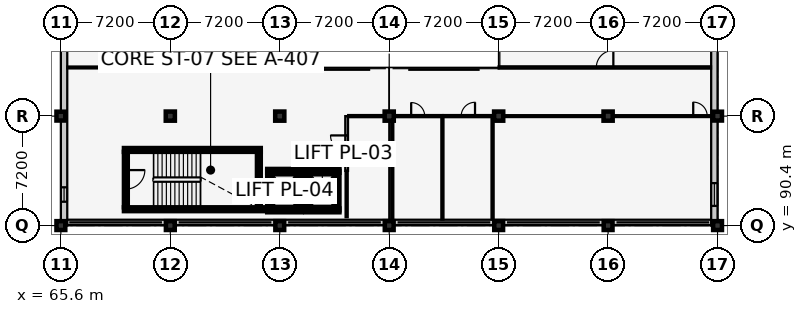
"""IFC4 building model, lengths in metres.
Left out: names, types, materials, properties, quantities, classifications, styles, units other than length and angle.
Written with IfcOpenShell. Run it as: python <this file> out.ifc"""

import sys

from ifc_helpers import new_model, si_unit, direction, frame, frame_2d, origin, origin_2d, place, context, subcontext, project, spatial, rectangle, extrude, element, fill, save


model = new_model("IFC4")
c1 = context("Model", 3, precision=1e-05, world=origin(), true_north=direction((0.0, 1.0)))
c2 = subcontext(c1, "Body", "Model", "MODEL_VIEW")
j1 = project(units=[si_unit("LENGTHUNIT", "METRE"), si_unit("PLANEANGLEUNIT", "RADIAN")], contexts=[c1])
p1 = place(None, origin())
s1 = spatial("IfcSite", under=j1, at=p1, CompositionType="ELEMENT")
p2 = place(p1, origin())
s2 = spatial("IfcBuilding", under=s1, at=p2, CompositionType="ELEMENT")
p3 = place(p2, frame((0.0, 0.0, 9.6)))
s3 = spatial("IfcBuildingStorey", under=s2, at=p3, CompositionType="ELEMENT", Elevation=9.6)
for number, where, z_axis, x_axis in (
    (1, (65.6, 90.4, 0.0), (0.0, 0.0, 1.0), (1.0, 0.0, 0.0)),
    (2, (65.6, 97.6, 0.0), (0.0, 0.0, 1.0), (1.0, 0.0, 0.0)),
    (3, (72.8, 90.4, 0.0), (0.0, 0.0, 1.0), (1.0, 0.0, 0.0)),
):
    element("IfcColumn", number, at=place(p3, frame(where, z_axis=z_axis, x_axis=x_axis)), inside=s3, PredefinedType="COLUMN", context=c2, shape_type="SweptSolid", body=[
        extrude(rectangle(XDim=0.58, YDim=0.58, at=origin_2d()), origin(), (0.0, 0.0, 1.0), 4.2),
    ])
p4 = place(p3, frame((72.8, 97.6, 0.0), z_axis=(0.0, 0.0, 1.0), x_axis=(1.0, 0.0, 0.0)))
e4 = element("IfcColumn", 4, at=p4, inside=s3, PredefinedType="COLUMN", context=c2, shape_type="SweptSolid", body=[
    extrude(rectangle(XDim=0.6, YDim=0.6, at=origin_2d()), origin(), (0.0, 0.0, 1.0), 4.2),
])
p5 = place(p3, frame((80.0, 90.4, 0.0), z_axis=(0.0, 0.0, 1.0), x_axis=(1.0, 0.0, 0.0)))
e5 = element("IfcColumn", 5, at=p5, inside=s3, PredefinedType="COLUMN", context=c2, shape_type="SweptSolid", body=[
    extrude(rectangle(XDim=0.58, YDim=0.58, at=origin_2d()), origin(), (0.0, 0.0, 1.0), 4.2),
])
p6 = place(p3, frame((80.0, 97.6, 0.0), z_axis=(0.0, 0.0, 1.0), x_axis=(1.0, 0.0, 0.0)))
e6 = element("IfcColumn", 6, at=p6, inside=s3, PredefinedType="COLUMN", context=c2, shape_type="SweptSolid", body=[
    extrude(rectangle(XDim=0.6, YDim=0.6, at=origin_2d()), origin(), (0.0, 0.0, 1.0), 4.2),
])
p7 = place(p3, frame((87.2, 90.4, 0.0), z_axis=(0.0, 0.0, 1.0), x_axis=(1.0, 0.0, 0.0)))
e7 = element("IfcColumn", 7, at=p7, inside=s3, PredefinedType="COLUMN", context=c2, shape_type="SweptSolid", body=[
    extrude(rectangle(XDim=0.58, YDim=0.58, at=origin_2d()), origin(), (0.0, 0.0, 1.0), 4.2),
])
p8 = place(p3, frame((87.2, 97.6, 0.0), z_axis=(0.0, 0.0, 1.0), x_axis=(1.0, 0.0, 0.0)))
e8 = element("IfcColumn", 8, at=p8, inside=s3, PredefinedType="COLUMN", context=c2, shape_type="SweptSolid", body=[
    extrude(rectangle(XDim=0.6, YDim=0.6, at=origin_2d()), origin(), (0.0, 0.0, 1.0), 4.2),
])
p9 = place(p3, frame((94.4, 90.4, 0.0), z_axis=(0.0, 0.0, 1.0), x_axis=(1.0, 0.0, 0.0)))
e9 = element("IfcColumn", 9, at=p9, inside=s3, PredefinedType="COLUMN", context=c2, shape_type="SweptSolid", body=[
    extrude(rectangle(XDim=0.58, YDim=0.58, at=origin_2d()), origin(), (0.0, 0.0, 1.0), 4.2),
])
p10 = place(p3, frame((94.4, 97.6, 0.0), z_axis=(0.0, 0.0, 1.0), x_axis=(1.0, 0.0, 0.0)))
e10 = element("IfcColumn", 10, at=p10, inside=s3, PredefinedType="COLUMN", context=c2, shape_type="SweptSolid", body=[
    extrude(rectangle(XDim=0.6, YDim=0.6, at=origin_2d()), origin(), (0.0, 0.0, 1.0), 4.2),
])
p11 = place(p3, frame((101.6, 90.4, 0.0), z_axis=(0.0, 0.0, 1.0), x_axis=(1.0, 0.0, 0.0)))
e11 = element("IfcColumn", 11, at=p11, inside=s3, PredefinedType="COLUMN", context=c2, shape_type="SweptSolid", body=[
    extrude(rectangle(XDim=0.58, YDim=0.58, at=origin_2d()), origin(), (0.0, 0.0, 1.0), 4.2),
])
p12 = place(p3, frame((101.6, 97.6, 0.0), z_axis=(0.0, 0.0, 1.0), x_axis=(1.0, 0.0, 0.0)))
e12 = element("IfcColumn", 12, at=p12, inside=s3, PredefinedType="COLUMN", context=c2, shape_type="SweptSolid", body=[
    extrude(rectangle(XDim=0.6, YDim=0.6, at=origin_2d()), origin(), (0.0, 0.0, 1.0), 4.2),
])
for number, where, z_axis, x_axis in (
    (13, (108.8, 90.4, 0.0), (0.0, 0.0, 1.0), (1.0, 0.0, 0.0)),
    (14, (108.8, 97.6, 0.0), (0.0, 0.0, 1.0), (1.0, 0.0, 0.0)),
):
    element("IfcColumn", number, at=place(p3, frame(where, z_axis=z_axis, x_axis=x_axis)), inside=s3, PredefinedType="COLUMN", context=c2, shape_type="SweptSolid", body=[
        extrude(rectangle(XDim=0.58, YDim=0.58, at=origin_2d()), origin(), (0.0, 0.0, 1.0), 4.2),
    ])
p13 = place(p3, frame((108.8, 90.61, 0.0), z_axis=(0.0, 0.0, 1.0), x_axis=(-1.0, 0.0, 0.0)))
e15 = element("IfcWall", 15, at=p13, inside=s3, PredefinedType="SOLIDWALL", context=c2, shape_type="SweptSolid", body=[
    extrude(rectangle(XDim=43.2, YDim=0.35, at=frame_2d((21.6, 0.0))), origin(), (0.0, 0.0, 1.0), 0.85),
])
p14 = place(p3, frame((108.59, 119.0, 0.0), z_axis=(0.0, 0.0, 1.0), x_axis=(0.0, -1.0, 0.0)))
e16 = element("IfcWall", 16, at=p14, inside=s3, PredefinedType="SOLIDWALL", context=c2, shape_type="SweptSolid", body=[
    extrude(rectangle(XDim=28.6, YDim=0.42, at=frame_2d((14.3, 0.0))), origin(), (0.0, 0.0, 1.0), 3.345),
])
p15 = place(p14, frame((1.318, 0.0, 0.9)))
e17 = element("IfcOpeningElement", 17, at=p15, cuts=e16, PredefinedType="OPENING", context=c2, shape_type="SweptSolid", body=[
    extrude(rectangle(XDim=1.45, YDim=1.45, at=frame_2d((0.725, 0.725))), frame((0.0, 0.222, 0.0), z_axis=(0.0, -1.0, 0.0), x_axis=(1.0, 0.0, 0.0)), (0.0, 0.0, 1.0), 0.444),
])
p16 = place(p14, frame((9.689, 0.0, 0.9)))
e18 = element("IfcOpeningElement", 18, at=p16, cuts=e16, PredefinedType="OPENING", context=c2, shape_type="SweptSolid", body=[
    extrude(rectangle(XDim=1.05, YDim=1.6, at=frame_2d((0.525, 0.8))), frame((0.0, 0.222, 0.0), z_axis=(0.0, -1.0, 0.0), x_axis=(1.0, 0.0, 0.0)), (0.0, 0.0, 1.0), 0.444),
])
p17 = place(p14, frame((25.807, 0.0, 0.9)))
e19 = element("IfcOpeningElement", 19, at=p17, cuts=e16, PredefinedType="OPENING", context=c2, shape_type="SweptSolid", body=[
    extrude(rectangle(XDim=1.5, YDim=1.6, at=frame_2d((0.75, 0.8))), frame((0.0, 0.222, 0.0), z_axis=(0.0, -1.0, 0.0), x_axis=(1.0, 0.0, 0.0)), (0.0, 0.0, 1.0), 0.444),
])
p18 = place(p3, frame((65.81, 90.4, 0.0), z_axis=(0.0, 0.0, 1.0), x_axis=(0.0, 1.0, 0.0)))
e20 = element("IfcWall", 20, at=p18, inside=s3, PredefinedType="SOLIDWALL", context=c2, shape_type="SweptSolid", body=[
    extrude(rectangle(XDim=28.6, YDim=0.42, at=frame_2d((14.3, 0.0))), origin(), (0.0, 0.0, 1.0), 3.315),
])
p19 = place(p18, frame((1.568, 0.0, 0.9)))
e21 = element("IfcOpeningElement", 21, at=p19, cuts=e20, PredefinedType="OPENING", context=c2, shape_type="SweptSolid", body=[
    extrude(rectangle(XDim=0.95, YDim=1.45, at=frame_2d((0.475, 0.725))), frame((0.0, 0.222, 0.0), z_axis=(0.0, -1.0, 0.0), x_axis=(1.0, 0.0, 0.0)), (0.0, 0.0, 1.0), 0.444),
])
p20 = place(p18, frame((17.711, 0.0, 0.9)))
e22 = element("IfcOpeningElement", 22, at=p20, cuts=e20, PredefinedType="OPENING", context=c2, shape_type="SweptSolid", body=[
    extrude(rectangle(XDim=1.35, YDim=1.45, at=frame_2d((0.675, 0.725))), frame((0.0, 0.222, 0.0), z_axis=(0.0, -1.0, 0.0), x_axis=(1.0, 0.0, 0.0)), (0.0, 0.0, 1.0), 0.444),
])
p21 = place(p18, frame((26.107, 0.0, 0.9)))
e23 = element("IfcOpeningElement", 23, at=p21, cuts=e20, PredefinedType="OPENING", context=c2, shape_type="SweptSolid", body=[
    extrude(rectangle(XDim=0.9, YDim=1.6, at=frame_2d((0.45, 0.8))), frame((0.0, 0.222, 0.0), z_axis=(0.0, -1.0, 0.0), x_axis=(1.0, 0.0, 0.0)), (0.0, 0.0, 1.0), 0.444),
])
p22 = place(p3, frame((69.75, 91.475, 0.0), z_axis=(0.0, 0.0, 1.0), x_axis=(1.0, 0.0, 0.0)))
e24 = element("IfcWall", 24, at=p22, inside=s3, PredefinedType="SHEAR", context=c2, shape_type="SweptSolid", body=[
    extrude(rectangle(XDim=9.57, YDim=0.25, at=frame_2d((4.785, 0.0))), origin(), (0.0, 0.0, 1.0), 3.92),
])
p23 = place(p3, frame((78.75, 95.375, 0.0), z_axis=(0.0, 0.0, 1.0), x_axis=(-1.0, 0.0, 0.0)))
e25 = element("IfcWall", 25, at=p23, inside=s3, PredefinedType="SHEAR", context=c2, shape_type="SweptSolid", body=[
    extrude(rectangle(XDim=9.0, YDim=0.25, at=frame_2d((4.5, 0.0))), origin(), (0.0, 0.0, 1.0), 3.92),
])
p24 = place(p3, frame((69.875, 95.25, 0.0), z_axis=(0.0, 0.0, 1.0), x_axis=(0.0, -1.0, 0.0)))
e26 = element("IfcWall", 26, at=p24, inside=s3, PredefinedType="SHEAR", context=c2, shape_type="SweptSolid", body=[
    extrude(rectangle(XDim=3.65, YDim=0.25, at=frame_2d((1.825, 0.0))), origin(), (0.0, 0.0, 1.0), 3.92),
])
p25 = place(p24, frame((1.2, 0.0, 0.0)))
e27 = element("IfcOpeningElement", 27, at=p25, cuts=e26, PredefinedType="OPENING", context=c2, shape_type="SweptSolid", body=[
    extrude(rectangle(XDim=1.25, YDim=2.15, at=frame_2d((0.625, 1.075))), frame((0.0, 0.137, 0.0), z_axis=(0.0, -1.0, 0.0), x_axis=(1.0, 0.0, 0.0)), (0.0, 0.0, 1.0), 0.274),
])
p26 = place(p3, frame((78.625, 91.6, 0.0), z_axis=(0.0, 0.0, 1.0), x_axis=(0.0, 1.0, 0.0)))
e28 = element("IfcWall", 28, at=p26, inside=s3, PredefinedType="SHEAR", context=c2, shape_type="SweptSolid", body=[
    extrude(rectangle(XDim=3.65, YDim=0.25, at=frame_2d((1.825, 0.0))), origin(), (0.0, 0.0, 1.0), 3.92),
])
p27 = place(p3, frame((79.175, 91.4, 0.0), z_axis=(0.0, 0.0, 1.0), x_axis=(1.0, 0.0, 0.0)))
e29 = element("IfcWall", 29, at=p27, inside=s3, PredefinedType="SHEAR", context=c2, shape_type="SweptSolid", body=[
    extrude(rectangle(XDim=2.25, YDim=0.25, at=frame_2d((1.125, 0.0))), origin(), (0.0, 0.0, 1.0), 3.92),
])
p28 = place(p3, frame((81.425, 94.0, 0.0), z_axis=(0.0, 0.0, 1.0), x_axis=(-1.0, 0.0, 0.0)))
e30 = element("IfcWall", 30, at=p28, inside=s3, PredefinedType="SHEAR", context=c2, shape_type="SweptSolid", body=[
    extrude(rectangle(XDim=2.25, YDim=0.25, at=frame_2d((1.125, 0.0))), origin(), (0.0, 0.0, 1.0), 3.92),
])
p29 = place(p28, frame((0.625, 0.0, 0.0)))
e31 = element("IfcOpeningElement", 31, at=p29, cuts=e30, PredefinedType="OPENING", context=c2, shape_type="SweptSolid", body=[
    extrude(rectangle(XDim=1.0, YDim=2.15, at=frame_2d((0.5, 1.075))), frame((0.0, 0.137, 0.0), z_axis=(0.0, -1.0, 0.0), x_axis=(1.0, 0.0, 0.0)), (0.0, 0.0, 1.0), 0.274),
])
for number, where, z_axis, x_axis in (
    (32, (79.3, 94.0, 0.0), (0.0, 0.0, 1.0), (0.0, -1.0, 0.0)),
    (33, (81.3, 91.4, 0.0), (0.0, 0.0, 1.0), (0.0, 1.0, 0.0)),
):
    element("IfcWall", number, at=place(p3, frame(where, z_axis=z_axis, x_axis=x_axis)), inside=s3, PredefinedType="SHEAR", context=c2, shape_type="SweptSolid", body=[
        extrude(rectangle(XDim=2.6, YDim=0.25, at=frame_2d((1.3, 0.0))), origin(), (0.0, 0.0, 1.0), 3.92),
    ])
p30 = place(p3, frame((81.675, 91.4, 0.0), z_axis=(0.0, 0.0, 1.0), x_axis=(1.0, 0.0, 0.0)))
e34 = element("IfcWall", 34, at=p30, inside=s3, PredefinedType="SHEAR", context=c2, shape_type="SweptSolid", body=[
    extrude(rectangle(XDim=2.25, YDim=0.25, at=frame_2d((1.125, 0.0))), origin(), (0.0, 0.0, 1.0), 3.92),
])
p31 = place(p3, frame((83.925, 94.0, 0.0), z_axis=(0.0, 0.0, 1.0), x_axis=(-1.0, 0.0, 0.0)))
e35 = element("IfcWall", 35, at=p31, inside=s3, PredefinedType="SHEAR", context=c2, shape_type="SweptSolid", body=[
    extrude(rectangle(XDim=2.25, YDim=0.25, at=frame_2d((1.125, 0.0))), origin(), (0.0, 0.0, 1.0), 3.92),
])
p32 = place(p31, frame((0.625, 0.0, 0.0)))
e36 = element("IfcOpeningElement", 36, at=p32, cuts=e35, PredefinedType="OPENING", context=c2, shape_type="SweptSolid", body=[
    extrude(rectangle(XDim=1.0, YDim=2.15, at=frame_2d((0.5, 1.075))), frame((0.0, 0.137, 0.0), z_axis=(0.0, -1.0, 0.0), x_axis=(1.0, 0.0, 0.0)), (0.0, 0.0, 1.0), 0.274),
])
for number, where, z_axis, x_axis in (
    (37, (81.8, 94.0, 0.0), (0.0, 0.0, 1.0), (0.0, -1.0, 0.0)),
    (38, (83.8, 91.4, 0.0), (0.0, 0.0, 1.0), (0.0, 1.0, 0.0)),
):
    element("IfcWall", number, at=place(p3, frame(where, z_axis=z_axis, x_axis=x_axis)), inside=s3, PredefinedType="SHEAR", context=c2, shape_type="SweptSolid", body=[
        extrude(rectangle(XDim=2.6, YDim=0.25, at=frame_2d((1.3, 0.0))), origin(), (0.0, 0.0, 1.0), 3.92),
    ])
p33 = place(p3, frame((84.4, 94.0, 0.0), z_axis=(0.0, 0.0, 1.0), x_axis=(0.0, 1.0, 0.0)))
e39 = element("IfcWall", 39, at=p33, inside=s3, PredefinedType="PARTITIONING", context=c2, shape_type="SweptSolid", body=[
    extrude(rectangle(XDim=3.6, YDim=0.18, at=frame_2d((1.8, 0.0))), origin(), (0.0, 0.0, 1.0), 3.92),
])
p34 = place(p33, frame((1.27, 0.0, 0.0)))
e40 = element("IfcOpeningElement", 40, at=p34, cuts=e39, PredefinedType="OPENING", context=c2, shape_type="SweptSolid", body=[
    extrude(rectangle(XDim=1.06, YDim=2.1, at=frame_2d((0.53, 1.05))), frame((0.0, 0.102, 0.0), z_axis=(0.0, -1.0, 0.0), x_axis=(1.0, 0.0, 0.0)), (0.0, 0.0, 1.0), 0.204),
])
p35 = place(p3, frame((84.5, 97.6, 0.0), z_axis=(0.0, 0.0, 1.0), x_axis=(1.0, 0.0, 0.0)))
e41 = element("IfcWall", 41, at=p35, inside=s3, PredefinedType="PARTITIONING", context=c2, shape_type="SweptSolid", body=[
    extrude(rectangle(XDim=2.9, YDim=0.14, at=frame_2d((1.45, 0.0))), origin(), (0.0, 0.0, 1.0), 3.095),
])
p36 = place(p3, frame((87.4, 90.8, 0.0), z_axis=(0.0, 0.0, 1.0), x_axis=(0.0, 1.0, 0.0)))
e42 = element("IfcWall", 42, at=p36, inside=s3, PredefinedType="PARTITIONING", context=c2, shape_type="SweptSolid", body=[
    extrude(rectangle(XDim=6.72, YDim=0.14, at=frame_2d((3.36, 0.0))), origin(), (0.0, 0.0, 1.0), 3.295),
])
p37 = place(p3, frame((87.48, 97.6, 0.0), z_axis=(0.0, 0.0, 1.0), x_axis=(1.0, 0.0, 0.0)))
e43 = element("IfcWall", 43, at=p37, inside=s3, PredefinedType="PARTITIONING", context=c2, shape_type="SweptSolid", body=[
    extrude(rectangle(XDim=3.22, YDim=0.14, at=frame_2d((1.61, 0.0))), origin(), (0.0, 0.0, 1.0), 3.045),
])
p38 = place(p37, frame((1.165, 0.0, 0.0)))
e44 = element("IfcOpeningElement", 44, at=p38, cuts=e43, PredefinedType="OPENING", context=c2, shape_type="SweptSolid", body=[
    extrude(rectangle(XDim=0.89, YDim=2.05, at=frame_2d((0.445, 1.025))), frame((0.0, 0.082, 0.0), z_axis=(0.0, -1.0, 0.0), x_axis=(1.0, 0.0, 0.0)), (0.0, 0.0, 1.0), 0.164),
])
p39 = place(p3, frame((90.7, 90.8, 0.0), z_axis=(0.0, 0.0, 1.0), x_axis=(0.0, 1.0, 0.0)))
e45 = element("IfcWall", 45, at=p39, inside=s3, PredefinedType="PARTITIONING", context=c2, shape_type="SweptSolid", body=[
    extrude(rectangle(XDim=6.72, YDim=0.14, at=frame_2d((3.36, 0.0))), origin(), (0.0, 0.0, 1.0), 3.495),
])
p40 = place(p3, frame((90.78, 97.6, 0.0), z_axis=(0.0, 0.0, 1.0), x_axis=(1.0, 0.0, 0.0)))
e46 = element("IfcWall", 46, at=p40, inside=s3, PredefinedType="PARTITIONING", context=c2, shape_type="SweptSolid", body=[
    extrude(rectangle(XDim=3.22, YDim=0.14, at=frame_2d((1.61, 0.0))), origin(), (0.0, 0.0, 1.0), 3.045),
])
p41 = place(p40, frame((1.155, 0.0, 0.0)))
e47 = element("IfcOpeningElement", 47, at=p41, cuts=e46, PredefinedType="OPENING", context=c2, shape_type="SweptSolid", body=[
    extrude(rectangle(XDim=0.91, YDim=2.06, at=frame_2d((0.455, 1.03))), frame((0.0, 0.082, 0.0), z_axis=(0.0, -1.0, 0.0), x_axis=(1.0, 0.0, 0.0)), (0.0, 0.0, 1.0), 0.164),
])
p42 = place(p3, frame((94.0, 90.8, 0.0), z_axis=(0.0, 0.0, 1.0), x_axis=(0.0, 1.0, 0.0)))
e48 = element("IfcWall", 48, at=p42, inside=s3, PredefinedType="PARTITIONING", context=c2, shape_type="SweptSolid", body=[
    extrude(rectangle(XDim=6.72, YDim=0.14, at=frame_2d((3.36, 0.0))), origin(), (0.0, 0.0, 1.0), 3.92),
])
p43 = place(p3, frame((94.08, 97.6, 0.0), z_axis=(0.0, 0.0, 1.0), x_axis=(1.0, 0.0, 0.0)))
e49 = element("IfcWall", 49, at=p43, inside=s3, PredefinedType="PARTITIONING", context=c2, shape_type="SweptSolid", body=[
    extrude(rectangle(XDim=14.29, YDim=0.125, at=frame_2d((7.145, 0.0))), origin(), (0.0, 0.0, 1.0), 3.235),
])
p44 = place(p43, frame((13.12, 0.0, 0.0)))
e50 = element("IfcOpeningElement", 50, at=p44, cuts=e49, PredefinedType="OPENING", context=c2, shape_type="SweptSolid", body=[
    extrude(rectangle(XDim=0.92, YDim=2.08, at=frame_2d((0.46, 1.04))), frame((0.0, 0.074, 0.0), z_axis=(0.0, -1.0, 0.0), x_axis=(1.0, 0.0, 0.0)), (0.0, 0.0, 1.0), 0.149),
])
p45 = place(p3, frame((77.0, 100.8, 0.0), z_axis=(0.0, 0.0, 1.0), x_axis=(0.0, 1.0, 0.0)))
e51 = element("IfcWall", 51, at=p45, inside=s3, PredefinedType="PARTITIONING", context=c2, shape_type="SweptSolid", body=[
    extrude(rectangle(XDim=17.77, YDim=0.18, at=frame_2d((8.885, 0.0))), origin(), (0.0, 0.0, 1.0), 3.92),
])
p46 = place(p45, frame((8.245, 0.0, 0.0)))
e52 = element("IfcOpeningElement", 52, at=p46, cuts=e51, PredefinedType="OPENING", context=c2, shape_type="SweptSolid", body=[
    extrude(rectangle(XDim=1.28, YDim=2.2, at=frame_2d((0.64, 1.1))), frame((0.0, 0.102, 0.0), z_axis=(0.0, -1.0, 0.0), x_axis=(1.0, 0.0, 0.0)), (0.0, 0.0, 1.0), 0.204),
])
p47 = place(p3, frame((66.03, 100.8, 0.0), z_axis=(0.0, 0.0, 1.0), x_axis=(1.0, 0.0, 0.0)))
e53 = element("IfcWall", 53, at=p47, inside=s3, PredefinedType="PARTITIONING", context=c2, shape_type="SweptSolid", body=[
    extrude(rectangle(XDim=10.87, YDim=0.125, at=frame_2d((5.435, 0.0))), origin(), (0.0, 0.0, 1.0), 3.92),
])
p48 = place(p3, frame((94.4, 100.8, 0.0), z_axis=(0.0, 0.0, 1.0), x_axis=(1.0, 0.0, 0.0)))
e54 = element("IfcWall", 54, at=p48, inside=s3, PredefinedType="PARTITIONING", context=c2, shape_type="SweptSolid", body=[
    extrude(rectangle(XDim=13.97, YDim=0.15, at=frame_2d((6.985, 0.0))), origin(), (0.0, 0.0, 1.0), 3.92),
])
p49 = place(p48, frame((6.425, 0.0, 0.0)))
e55 = element("IfcOpeningElement", 55, at=p49, cuts=e54, PredefinedType="OPENING", context=c2, shape_type="SweptSolid", body=[
    extrude(rectangle(XDim=1.12, YDim=2.15, at=frame_2d((0.56, 1.075))), frame((0.0, 0.087, 0.0), z_axis=(0.0, -1.0, 0.0), x_axis=(1.0, 0.0, 0.0)), (0.0, 0.0, 1.0), 0.174),
])
p50 = place(p3, frame((84.4, 90.95, 0.0), z_axis=(0.0, 0.0, 1.0), x_axis=(0.0, 1.0, 0.0)))
e56 = element("IfcWall", 56, at=p50, inside=s3, PredefinedType="PARTITIONING", context=c2, shape_type="SweptSolid", body=[
    extrude(rectangle(XDim=3.0, YDim=0.14, at=frame_2d((1.5, 0.0))), origin(), (0.0, 0.0, 1.0), 3.92),
])
p51 = place(p17, origin())
e57 = element("IfcWindow", 57, at=p51, inside=s3, PartitioningType="SINGLE_PANEL", PredefinedType="WINDOW", context=c2, shape_type="SweptSolid", body=[
    extrude(rectangle(XDim=1.5, YDim=1.6, at=frame_2d((0.75, 0.8))), frame((0.0, 0.03, 0.0), z_axis=(0.0, -1.0, 0.0), x_axis=(1.0, 0.0, 0.0)), (0.0, 0.0, 1.0), 0.06),
])
fill(e19, e57)
p52 = place(p19, origin())
e58 = element("IfcWindow", 58, at=p52, inside=s3, PartitioningType="SINGLE_PANEL", PredefinedType="WINDOW", context=c2, shape_type="SweptSolid", body=[
    extrude(rectangle(XDim=0.95, YDim=1.45, at=frame_2d((0.475, 0.725))), frame((0.0, 0.03, 0.0), z_axis=(0.0, -1.0, 0.0), x_axis=(1.0, 0.0, 0.0)), (0.0, 0.0, 1.0), 0.06),
])
fill(e21, e58)
p53 = place(p25, origin())
e59 = element("IfcDoor", 59, at=p53, inside=s3, OperationType="SINGLE_SWING_LEFT", PredefinedType="DOOR", context=c2, shape_type="SweptSolid", body=[
    extrude(rectangle(XDim=1.25, YDim=2.15, at=frame_2d((0.625, 1.075))), frame((0.0, 0.025, 0.0), z_axis=(0.0, -1.0, 0.0), x_axis=(1.0, 0.0, 0.0)), (0.0, 0.0, 1.0), 0.05),
])
fill(e27, e59)
p54 = place(p29, origin())
e60 = element("IfcDoor", 60, at=p54, inside=s3, OperationType="SLIDING_TO_LEFT", PredefinedType="DOOR", context=c2, shape_type="SweptSolid", body=[
    extrude(rectangle(XDim=1.0, YDim=2.15, at=frame_2d((0.5, 1.075))), frame((0.0, 0.025, 0.0), z_axis=(0.0, -1.0, 0.0), x_axis=(1.0, 0.0, 0.0)), (0.0, 0.0, 1.0), 0.05),
])
fill(e31, e60)
p55 = place(p32, origin())
e61 = element("IfcDoor", 61, at=p55, inside=s3, OperationType="SLIDING_TO_LEFT", PredefinedType="DOOR", context=c2, shape_type="SweptSolid", body=[
    extrude(rectangle(XDim=1.0, YDim=2.15, at=frame_2d((0.5, 1.075))), frame((0.0, 0.025, 0.0), z_axis=(0.0, -1.0, 0.0), x_axis=(1.0, 0.0, 0.0)), (0.0, 0.0, 1.0), 0.05),
])
fill(e36, e61)
p56 = place(p34, origin())
e62 = element("IfcDoor", 62, at=p56, inside=s3, OperationType="SINGLE_SWING_RIGHT", PredefinedType="DOOR", context=c2, shape_type="SweptSolid", body=[
    extrude(rectangle(XDim=1.06, YDim=2.1, at=frame_2d((0.53, 1.05))), frame((0.0, 0.025, 0.0), z_axis=(0.0, -1.0, 0.0), x_axis=(1.0, 0.0, 0.0)), (0.0, 0.0, 1.0), 0.05),
])
fill(e40, e62)
p57 = place(p38, origin())
e63 = element("IfcDoor", 63, at=p57, inside=s3, OperationType="SINGLE_SWING_LEFT", PredefinedType="DOOR", context=c2, shape_type="SweptSolid", body=[
    extrude(rectangle(XDim=0.89, YDim=2.05, at=frame_2d((0.445, 1.025))), frame((0.0, 0.025, 0.0), z_axis=(0.0, -1.0, 0.0), x_axis=(1.0, 0.0, 0.0)), (0.0, 0.0, 1.0), 0.05),
])
fill(e44, e63)
p58 = place(p41, origin())
e64 = element("IfcDoor", 64, at=p58, inside=s3, OperationType="SINGLE_SWING_RIGHT", PredefinedType="DOOR", context=c2, shape_type="SweptSolid", body=[
    extrude(rectangle(XDim=0.91, YDim=2.06, at=frame_2d((0.455, 1.03))), frame((0.0, 0.025, 0.0), z_axis=(0.0, -1.0, 0.0), x_axis=(1.0, 0.0, 0.0)), (0.0, 0.0, 1.0), 0.05),
])
fill(e47, e64)
p59 = place(p44, origin())
e65 = element("IfcDoor", 65, at=p59, inside=s3, OperationType="SINGLE_SWING_LEFT", PredefinedType="DOOR", context=c2, shape_type="SweptSolid", body=[
    extrude(rectangle(XDim=0.92, YDim=2.08, at=frame_2d((0.46, 1.04))), frame((0.0, 0.025, 0.0), z_axis=(0.0, -1.0, 0.0), x_axis=(1.0, 0.0, 0.0)), (0.0, 0.0, 1.0), 0.05),
])
fill(e50, e65)
p60 = place(p49, origin())
e66 = element("IfcDoor", 66, at=p60, inside=s3, OperationType="SINGLE_SWING_RIGHT", PredefinedType="DOOR", context=c2, shape_type="SweptSolid", body=[
    extrude(rectangle(XDim=1.12, YDim=2.15, at=frame_2d((0.56, 1.075))), frame((0.0, 0.025, 0.0), z_axis=(0.0, -1.0, 0.0), x_axis=(1.0, 0.0, 0.0)), (0.0, 0.0, 1.0), 0.05),
])
fill(e55, e66)
save(model, sys.argv[1])
